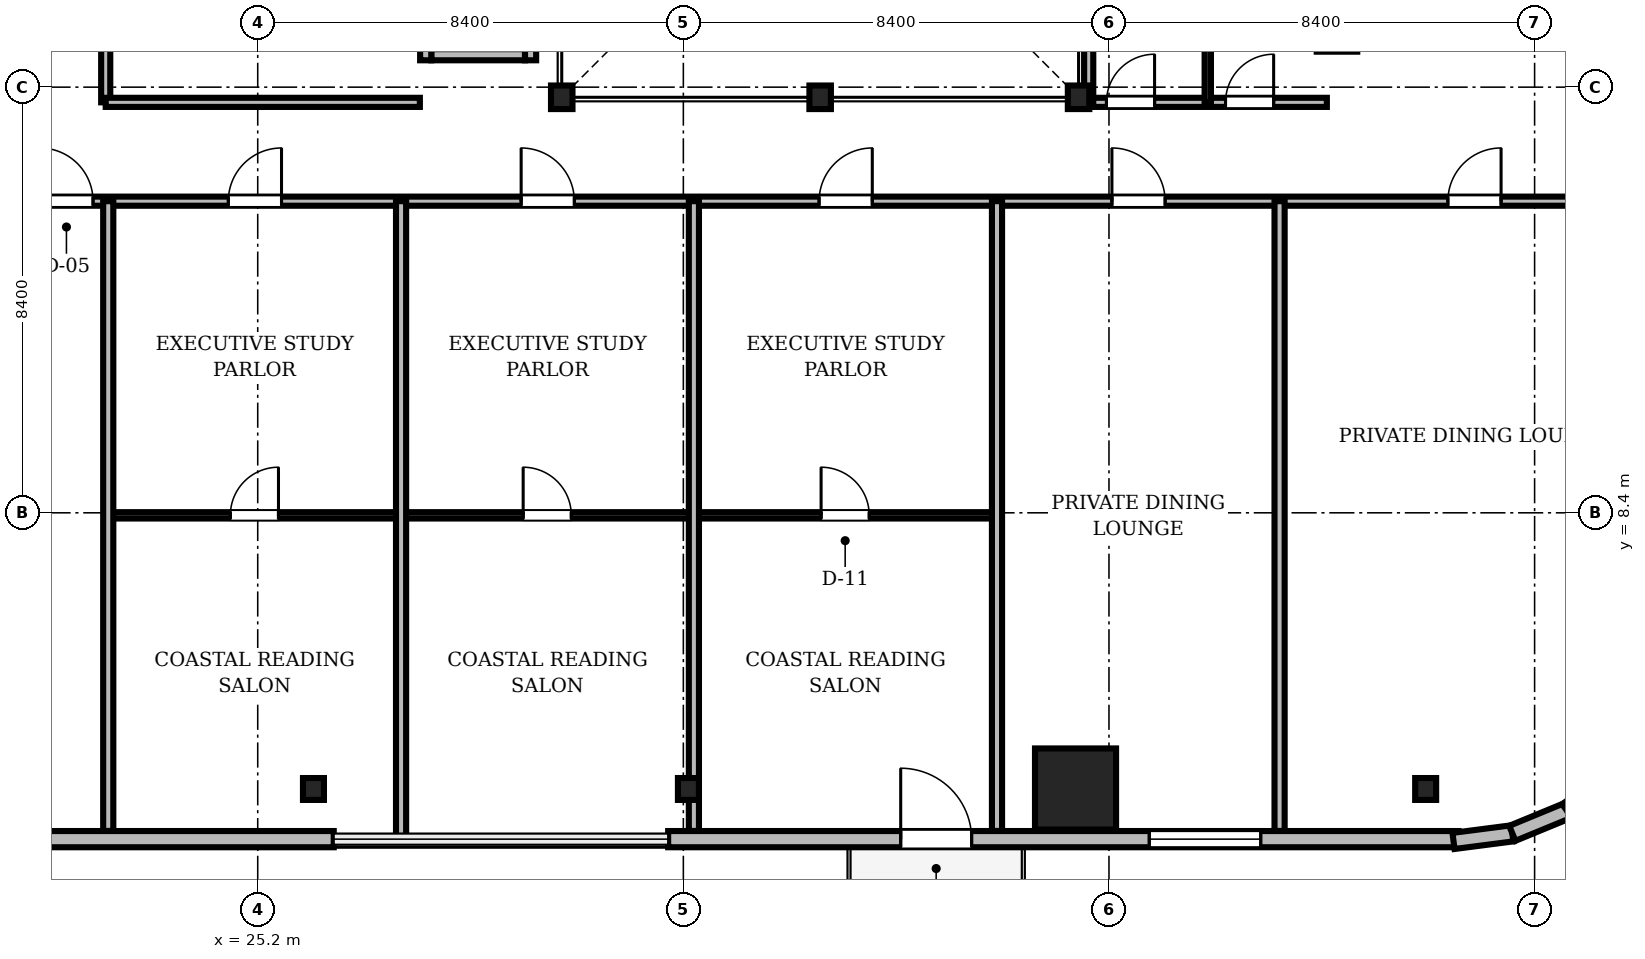
"""IFC4 building model, lengths in metres.
Left out: names, types, materials, properties, quantities, classifications, styles, units other than length and angle.
Written with IfcOpenShell. Run it as: python <this file> out.ifc"""

import sys

from ifc_helpers import new_model, si_unit, direction, frame, frame_2d, origin, origin_2d, place, context, subcontext, project, spatial, rectangle, i_section, extrude, source, transform, mapped, element, fill, save


model = new_model("IFC4")
c1 = context("Model", 3, precision=1e-05, world=origin(), true_north=direction((0.0, 1.0)))
c2 = subcontext(c1, "Body", "Model", "MODEL_VIEW")
j1 = project(units=[si_unit("LENGTHUNIT", "METRE"), si_unit("PLANEANGLEUNIT", "RADIAN")], contexts=[c1])
p1 = place(None, origin())
s1 = spatial("IfcSite", under=j1, at=p1, CompositionType="ELEMENT")
p2 = place(p1, origin())
s2 = spatial("IfcBuilding", under=s1, at=p2, CompositionType="ELEMENT")
p3 = place(p2, frame((0.0, 0.0, 144.6)))
s3 = spatial("IfcBuildingStorey", under=s2, at=p3, CompositionType="ELEMENT", Elevation=144.6)
m1 = source(origin(), c2, "Body", "SweptSolid", [
    extrude(i_section(OverallWidth=0.424, OverallDepth=0.465, WebThickness=0.035, FlangeThickness=0.056, FilletRadius=0.015, at=origin_2d()), origin(), (0.0, 0.0, 1.0), 3.46),
])
for number, where, z_axis, x_axis in (
    (1, (31.2, 16.6, 0.0), (0.0, 0.0, 1.0), (1.0, 0.0, 0.0)),
    (2, (36.3, 16.6, 0.0), (0.0, 0.0, 1.0), (1.0, 0.0, 0.0)),
    (3, (41.4, 16.6, 0.0), (0.0, 0.0, 1.0), (1.0, 0.0, 0.0)),
):
    element("IfcColumn", number, at=place(p3, frame(where, z_axis=z_axis, x_axis=x_axis)), inside=s3, PredefinedType="COLUMN", context=c2, shape_type="MappedRepresentation", body=[
        mapped(m1, transform((0.0, 0.0, 0.0), scale=1.0)),
    ])
m2 = source(origin(), c2, "Body", "SweptSolid", [
    extrude(rectangle(XDim=1.6, YDim=1.6, at=origin_2d()), origin(), (0.0, 0.0, 1.0), 3.46),
])
p4 = place(p3, frame((41.34, 2.95, 0.0), z_axis=(0.0, 0.0, 1.0), x_axis=(1.0, 0.0, 0.0)))
e4 = element("IfcColumn", 4, at=p4, inside=s3, PredefinedType="COLUMN", context=c2, shape_type="MappedRepresentation", body=[
    mapped(m2, transform((0.0, 0.0, 0.0), scale=1.0)),
])
m3 = source(origin(), c2, "Body", "SweptSolid", [
    extrude(i_section(OverallWidth=0.414, OverallDepth=0.432, WebThickness=0.026, FlangeThickness=0.04, FilletRadius=0.015, at=origin_2d()), origin(), (0.0, 0.0, 1.0), 3.46),
])
for number, where, z_axis, x_axis in (
    (5, (26.3, 2.95, 0.0), (0.0, 0.0, 1.0), (1.0, 0.0, 0.0)),
    (6, (33.7, 2.95, 0.0), (0.0, 0.0, 1.0), (1.0, 0.0, 0.0)),
    (7, (48.25, 2.95, 0.0), (0.0, 0.0, 1.0), (1.0, 0.0, 0.0)),
):
    element("IfcColumn", number, at=place(p3, frame(where, z_axis=z_axis, x_axis=x_axis)), inside=s3, PredefinedType="COLUMN", context=c2, shape_type="MappedRepresentation", body=[
        mapped(m3, transform((0.0, 0.0, 0.0), scale=1.0)),
    ])
m4 = source(origin(), c2, "Body", "SweptSolid", [
    extrude(rectangle(XDim=15.6, YDim=0.32, at=frame_2d((7.8, 0.0))), origin(), (0.0, 0.0, 1.0), 3.46),
])
p5 = place(p3, frame((11.1, 1.96, 0.0), z_axis=(0.0, 0.0, 1.0), x_axis=(1.0, 0.0, 0.0)))
e8 = element("IfcWall", 8, at=p5, inside=s3, PredefinedType="SOLIDWALL", context=c2, shape_type="MappedRepresentation", body=[
    mapped(m4, transform((0.0, 0.0, 0.0), scale=1.0)),
])
m5 = source(origin(), c2, "Body", "SweptSolid", [
    extrude(rectangle(XDim=2.2, YDim=2.4, at=frame_2d((1.1, 1.2))), frame((0.0, 0.17, 0.0), z_axis=(0.0, -1.0, 0.0), x_axis=(1.0, 0.0, 0.0)), (0.0, 0.0, 1.0), 0.34),
])
p6 = place(p5, frame((3.005, 0.0, 0.72)))
e9 = element("IfcOpeningElement", 9, at=p6, cuts=e8, PredefinedType="OPENING", context=c2, shape_type="MappedRepresentation", body=[
    mapped(m5, transform((0.0, 0.0, 0.0), scale=1.0)),
])
p7 = place(p3, frame((33.3, 1.96, 0.0), z_axis=(0.0, 0.0, 1.0), x_axis=(1.0, 0.0, 0.0)))
e10 = element("IfcWall", 10, at=p7, inside=s3, PredefinedType="SOLIDWALL", context=c2, shape_type="MappedRepresentation", body=[
    mapped(m4, transform((0.0, 0.0, 0.0), scale=1.0)),
])
m6 = source(origin(), c2, "Body", "SweptSolid", [
    extrude(rectangle(XDim=1.4, YDim=2.3, at=frame_2d((0.7, 1.15))), frame((0.0, 0.17, 0.0), z_axis=(0.0, -1.0, 0.0), x_axis=(1.0, 0.0, 0.0)), (0.0, 0.0, 1.0), 0.34),
])
p8 = place(p7, frame((4.59, 0.0, 0.0)))
e11 = element("IfcOpeningElement", 11, at=p8, cuts=e10, PredefinedType="OPENING", context=c2, shape_type="MappedRepresentation", body=[
    mapped(m6, transform((0.0, 0.0, 0.0), scale=1.0)),
])
p9 = place(p7, frame((9.495, 0.0, 0.72)))
e12 = element("IfcOpeningElement", 12, at=p9, cuts=e10, PredefinedType="OPENING", context=c2, shape_type="MappedRepresentation", body=[
    mapped(m5, transform((0.0, 0.0, 0.0), scale=1.0)),
])
m7 = source(origin(), c2, "Body", "SweptSolid", [
    extrude(rectangle(XDim=1.17, YDim=0.32, at=frame_2d((0.585, 0.0))), origin(), (0.0, 0.0, 1.0), 3.46),
])
p10 = place(p3, frame((48.8, 1.925, 0.0), z_axis=(0.0, 0.0, 1.0), x_axis=(0.991762485493, 0.128090485085, 0.0)))
e13 = element("IfcWall", 13, at=p10, inside=s3, PredefinedType="SOLIDWALL", context=c2, shape_type="MappedRepresentation", body=[
    mapped(m7, transform((0.0, 0.0, 0.0), scale=1.0)),
])
m8 = source(origin(), c2, "Body", "SweptSolid", [
    extrude(rectangle(XDim=1.169, YDim=0.32, at=frame_2d((0.585, 0.0))), origin(), (0.0, 0.0, 1.0), 3.46),
])
p11 = place(p3, frame((49.96, 2.074, 0.0), z_axis=(0.0, 0.0, 1.0), x_axis=(0.924479075121, 0.381232789334, 0.0)))
e14 = element("IfcWall", 14, at=p11, inside=s3, PredefinedType="SOLIDWALL", context=c2, shape_type="MappedRepresentation", body=[
    mapped(m8, transform((0.0, 0.0, 0.0), scale=1.0)),
])
m9 = source(origin(), c2, "Body", "SweptSolid", [
    extrude(rectangle(XDim=1.169, YDim=0.32, at=frame_2d((0.584, 0.0))), origin(), (0.0, 0.0, 1.0), 3.46),
])
p12 = place(p3, frame((51.041, 2.52, 0.0), z_axis=(0.0, 0.0, 1.0), x_axis=(0.793663520347, 0.608356981114, 0.0)))
e15 = element("IfcWall", 15, at=p12, inside=s3, PredefinedType="SOLIDWALL", context=c2, shape_type="MappedRepresentation", body=[
    mapped(m9, transform((0.0, 0.0, 0.0), scale=1.0)),
])
m10 = source(origin(), c2, "Body", "SweptSolid", [
    extrude(rectangle(XDim=1.85, YDim=0.22, at=frame_2d((0.925, 0.0))), origin(), (0.0, 0.0, 1.0), 3.46),
])
p13 = place(p3, frame((28.625, 17.44, 0.0), z_axis=(0.0, 0.0, 1.0), x_axis=(1.0, 0.0, 0.0)))
e16 = element("IfcWall", 16, at=p13, inside=s3, PredefinedType="SOLIDWALL", context=c2, shape_type="MappedRepresentation", body=[
    mapped(m10, transform((0.0, 0.0, 0.0), scale=1.0)),
])
m11 = source(origin(), c2, "Body", "SweptSolid", [
    extrude(rectangle(XDim=2.54, YDim=0.22, at=frame_2d((1.27, 0.0))), origin(), (0.0, 0.0, 1.0), 3.46),
])
for number, where, z_axis, x_axis in (
    (17, (28.515, 17.33, 0.0), (0.0, 0.0, 1.0), (0.0, 1.0, 0.0)),
    (18, (30.585, 17.33, 0.0), (0.0, 0.0, 1.0), (0.0, 1.0, 0.0)),
):
    element("IfcWall", number, at=place(p3, frame(where, z_axis=z_axis, x_axis=x_axis)), inside=s3, PredefinedType="SOLIDWALL", context=c2, shape_type="MappedRepresentation", body=[
        mapped(m11, transform((0.0, 0.0, 0.0), scale=1.0)),
    ])
m12 = source(origin(), c2, "Body", "SweptSolid", [
    extrude(rectangle(XDim=46.156, YDim=0.18, at=frame_2d((23.078, 0.0))), origin(), (0.0, 0.0, 1.0), 2.702),
])
p14 = place(p3, frame((6.922, 14.55, 0.0), z_axis=(0.0, 0.0, 1.0), x_axis=(1.0, 0.0, 0.0)))
e19 = element("IfcWall", 19, at=p14, inside=s3, PredefinedType="PARTITIONING", context=c2, shape_type="MappedRepresentation", body=[
    mapped(m12, transform((0.0, 0.0, 0.0), scale=1.0)),
])
m13 = source(origin(), c2, "Body", "SweptSolid", [
    extrude(rectangle(XDim=1.05, YDim=2.2, at=frame_2d((0.525, 1.1))), frame((0.0, 0.1, 0.0), z_axis=(0.0, -1.0, 0.0), x_axis=(1.0, 0.0, 0.0)), (0.0, 0.0, 1.0), 0.2),
])
p15 = place(p14, frame((13.978, 0.0, 0.0)))
e20 = element("IfcOpeningElement", 20, at=p15, cuts=e19, PredefinedType="OPENING", context=c2, shape_type="MappedRepresentation", body=[
    mapped(m13, transform((0.0, 0.0, 0.0), scale=1.0)),
])
p16 = place(p14, frame((17.698, 0.0, 0.0)))
e21 = element("IfcOpeningElement", 21, at=p16, cuts=e19, PredefinedType="OPENING", context=c2, shape_type="MappedRepresentation", body=[
    mapped(m13, transform((0.0, 0.0, 0.0), scale=1.0)),
])
p17 = place(p14, frame((23.477, 0.0, 0.0)))
e22 = element("IfcOpeningElement", 22, at=p17, cuts=e19, PredefinedType="OPENING", context=c2, shape_type="MappedRepresentation", body=[
    mapped(m13, transform((0.0, 0.0, 0.0), scale=1.0)),
])
p18 = place(p14, frame((29.357, 0.0, 0.0)))
e23 = element("IfcOpeningElement", 23, at=p18, cuts=e19, PredefinedType="OPENING", context=c2, shape_type="MappedRepresentation", body=[
    mapped(m13, transform((0.0, 0.0, 0.0), scale=1.0)),
])
p19 = place(p14, frame((35.136, 0.0, 0.0)))
e24 = element("IfcOpeningElement", 24, at=p19, cuts=e19, PredefinedType="OPENING", context=c2, shape_type="MappedRepresentation", body=[
    mapped(m13, transform((0.0, 0.0, 0.0), scale=1.0)),
])
p20 = place(p14, frame((41.766, 0.0, 0.0)))
e25 = element("IfcOpeningElement", 25, at=p20, cuts=e19, PredefinedType="OPENING", context=c2, shape_type="MappedRepresentation", body=[
    mapped(m13, transform((0.0, 0.0, 0.0), scale=1.0)),
])
m14 = source(origin(), c2, "Body", "SweptSolid", [
    extrude(rectangle(XDim=5.982, YDim=0.125, at=frame_2d((2.991, 0.0))), origin(), (0.0, 0.0, 1.0), 2.852),
])
p21 = place(p3, frame((33.808, 8.35, 0.0), z_axis=(0.0, 0.0, 1.0), x_axis=(1.0, 0.0, 0.0)))
e26 = element("IfcWall", 26, at=p21, inside=s3, PredefinedType="PARTITIONING", context=c2, shape_type="MappedRepresentation", body=[
    mapped(m14, transform((0.0, 0.0, 0.0), scale=1.0)),
])
m15 = source(origin(), c2, "Body", "SweptSolid", [
    extrude(rectangle(XDim=0.95, YDim=2.15, at=frame_2d((0.475, 1.075))), frame((0.0, 0.073, 0.0), z_axis=(0.0, -1.0, 0.0), x_axis=(1.0, 0.0, 0.0)), (0.0, 0.0, 1.0), 0.145),
])
p22 = place(p21, frame((2.51, 0.0, 0.0)))
e27 = element("IfcOpeningElement", 27, at=p22, cuts=e26, PredefinedType="OPENING", context=c2, shape_type="MappedRepresentation", body=[
    mapped(m15, transform((0.0, 0.0, 0.0), scale=1.0)),
])
m16 = source(origin(), c2, "Body", "SweptSolid", [
    extrude(rectangle(XDim=5.779, YDim=0.125, at=frame_2d((2.89, 0.0))), origin(), (0.0, 0.0, 1.0), 2.852),
])
p23 = place(p3, frame((22.25, 8.35, 0.0), z_axis=(0.0, 0.0, 1.0), x_axis=(1.0, 0.0, 0.0)))
e28 = element("IfcWall", 28, at=p23, inside=s3, PredefinedType="PARTITIONING", context=c2, shape_type="MappedRepresentation", body=[
    mapped(m16, transform((0.0, 0.0, 0.0), scale=1.0)),
])
p24 = place(p23, frame((2.41, 0.0, 0.0)))
e29 = element("IfcOpeningElement", 29, at=p24, cuts=e28, PredefinedType="OPENING", context=c2, shape_type="MappedRepresentation", body=[
    mapped(m15, transform((0.0, 0.0, 0.0), scale=1.0)),
])
p25 = place(p3, frame((28.029, 8.35, 0.0), z_axis=(0.0, 0.0, 1.0), x_axis=(1.0, 0.0, 0.0)))
e30 = element("IfcWall", 30, at=p25, inside=s3, PredefinedType="PARTITIONING", context=c2, shape_type="MappedRepresentation", body=[
    mapped(m16, transform((0.0, 0.0, 0.0), scale=1.0)),
])
p26 = place(p25, frame((2.41, 0.0, 0.0)))
e31 = element("IfcOpeningElement", 31, at=p26, cuts=e30, PredefinedType="OPENING", context=c2, shape_type="MappedRepresentation", body=[
    mapped(m15, transform((0.0, 0.0, 0.0), scale=1.0)),
])
m17 = source(origin(), c2, "Body", "SweptSolid", [
    extrude(rectangle(XDim=5.4, YDim=0.18, at=frame_2d((2.7, 0.0))), origin(), (0.0, 0.0, 1.0), 2.852),
])
p27 = place(p3, frame((22.2, 16.5, 0.0), z_axis=(0.0, 0.0, 1.0), x_axis=(0.0, 1.0, 0.0)))
e32 = element("IfcWall", 32, at=p27, inside=s3, PredefinedType="PARTITIONING", context=c2, shape_type="MappedRepresentation", body=[
    mapped(m17, transform((0.0, 0.0, 0.0), scale=1.0)),
])
p28 = place(p27, frame((2.0, 0.0, 0.0)))
e33 = element("IfcOpeningElement", 33, at=p28, cuts=e32, PredefinedType="OPENING", context=c2, shape_type="MappedRepresentation", body=[
    mapped(m13, transform((0.0, 0.0, 0.0), scale=1.0)),
])
m18 = source(origin(), c2, "Body", "SweptSolid", [
    extrude(rectangle(XDim=4.7, YDim=0.18, at=frame_2d((2.35, 0.0))), origin(), (0.0, 0.0, 1.0), 2.852),
])
p29 = place(p3, frame((41.6, 16.5, 0.0), z_axis=(0.0, 0.0, 1.0), x_axis=(1.0, 0.0, 0.0)))
e34 = element("IfcWall", 34, at=p29, inside=s3, PredefinedType="PARTITIONING", context=c2, shape_type="MappedRepresentation", body=[
    mapped(m18, transform((0.0, 0.0, 0.0), scale=1.0)),
])
m19 = source(origin(), c2, "Body", "SweptSolid", [
    extrude(rectangle(XDim=0.95, YDim=2.15, at=frame_2d((0.475, 1.075))), frame((0.0, 0.1, 0.0), z_axis=(0.0, -1.0, 0.0), x_axis=(1.0, 0.0, 0.0)), (0.0, 0.0, 1.0), 0.2),
])
p30 = place(p29, frame((0.35, 0.0, 0.0)))
e35 = element("IfcOpeningElement", 35, at=p30, cuts=e34, PredefinedType="OPENING", context=c2, shape_type="MappedRepresentation", body=[
    mapped(m19, transform((0.0, 0.0, 0.0), scale=1.0)),
])
p31 = place(p29, frame((2.7, 0.0, 0.0)))
e36 = element("IfcOpeningElement", 36, at=p31, cuts=e34, PredefinedType="OPENING", context=c2, shape_type="MappedRepresentation", body=[
    mapped(m19, transform((0.0, 0.0, 0.0), scale=1.0)),
])
m20 = source(origin(), c2, "Body", "SweptSolid", [
    extrude(rectangle(XDim=12.428, YDim=0.2, at=frame_2d((6.214, 0.0))), origin(), (0.0, 0.0, 1.0), 2.702),
])
p32 = place(p3, frame((22.25, 2.122, 0.0), z_axis=(0.0, 0.0, 1.0), x_axis=(0.0, 1.0, 0.0)))
e37 = element("IfcWall", 37, at=p32, inside=s3, PredefinedType="PARTITIONING", context=c2, shape_type="MappedRepresentation", body=[
    mapped(m20, transform((0.0, 0.0, 0.0), scale=1.0)),
])
m21 = source(origin(), c2, "Body", "SweptSolid", [
    extrude(rectangle(XDim=12.62, YDim=0.2, at=frame_2d((6.31, 0.0))), origin(), (0.0, 0.0, 1.0), 2.702),
])
p33 = place(p3, frame((28.029, 1.93, 0.0), z_axis=(0.0, 0.0, 1.0), x_axis=(0.0, 1.0, 0.0)))
e38 = element("IfcWall", 38, at=p33, inside=s3, PredefinedType="PARTITIONING", context=c2, shape_type="MappedRepresentation", body=[
    mapped(m21, transform((0.0, 0.0, 0.0), scale=1.0)),
])
for number, where, z_axis, x_axis in (
    (39, (33.808, 2.122, 0.0), (0.0, 0.0, 1.0), (0.0, 1.0, 0.0)),
    (40, (39.79, 2.122, 0.0), (0.0, 0.0, 1.0), (0.0, 1.0, 0.0)),
    (41, (45.367, 2.122, 0.0), (0.0, 0.0, 1.0), (0.0, 1.0, 0.0)),
):
    element("IfcWall", number, at=place(p3, frame(where, z_axis=z_axis, x_axis=x_axis)), inside=s3, PredefinedType="PARTITIONING", context=c2, shape_type="MappedRepresentation", body=[
        mapped(m20, transform((0.0, 0.0, 0.0), scale=1.0)),
    ])
m22 = source(origin(), c2, "Body", "SweptSolid", [
    extrude(rectangle(XDim=7.15, YDim=0.18, at=frame_2d((3.575, 0.0))), origin(), (0.0, 0.0, 1.0), 2.852),
])
p34 = place(p3, frame((41.6, 16.5, 0.0), z_axis=(0.0, 0.0, 1.0), x_axis=(0.0, 1.0, 0.0)))
e42 = element("IfcWall", 42, at=p34, inside=s3, PredefinedType="PARTITIONING", context=c2, shape_type="MappedRepresentation", body=[
    mapped(m22, transform((0.0, 0.0, 0.0), scale=1.0)),
])
m23 = source(origin(), c2, "Body", "SweptSolid", [
    extrude(rectangle(XDim=7.15, YDim=0.125, at=frame_2d((3.575, 0.0))), origin(), (0.0, 0.0, 1.0), 2.852),
])
p35 = place(p3, frame((43.95, 16.5, 0.0), z_axis=(0.0, 0.0, 1.0), x_axis=(0.0, 1.0, 0.0)))
e43 = element("IfcWall", 43, at=p35, inside=s3, PredefinedType="PARTITIONING", context=c2, shape_type="MappedRepresentation", body=[
    mapped(m23, transform((0.0, 0.0, 0.0), scale=1.0)),
])
m24 = source(origin(), c2, "Body", "SweptSolid", [
    extrude(rectangle(XDim=6.2, YDim=0.18, at=frame_2d((3.1, 0.0))), origin(), (0.0, 0.0, 1.0), 3.46),
])
p36 = place(p3, frame((22.2, 16.5, 0.0), z_axis=(0.0, 0.0, 1.0), x_axis=(1.0, 0.0, 0.0)))
e44 = element("IfcWall", 44, at=p36, inside=s3, PredefinedType="PARTITIONING", context=c2, shape_type="MappedRepresentation", body=[
    mapped(m24, transform((0.0, 0.0, 0.0), scale=1.0)),
])
m25 = source(origin(), c2, "Body", "SweptSolid", [
    extrude(rectangle(XDim=1.4, YDim=2.3, at=frame_2d((0.7, 1.15))), frame((0.0, 0.025, 0.0), z_axis=(0.0, -1.0, 0.0), x_axis=(1.0, 0.0, 0.0)), (0.0, 0.0, 1.0), 0.05),
])
p37 = place(p8, frame((1.4, 0.0, 0.0), z_axis=(0.0, 0.0, 1.0), x_axis=(-1.0, 0.0, 0.0)))
e45 = element("IfcDoor", 45, at=p37, inside=s3, OperationType="DOUBLE_DOOR_SLIDING", PredefinedType="DOOR", context=c2, shape_type="MappedRepresentation", body=[
    mapped(m25, transform((0.0, 0.0, 0.0), scale=1.0)),
])
fill(e11, e45)
m26 = source(origin(), c2, "Body", "SweptSolid", [
    extrude(rectangle(XDim=2.2, YDim=2.4, at=frame_2d((1.1, 1.2))), frame((0.0, 0.03, 0.0), z_axis=(0.0, -1.0, 0.0), x_axis=(1.0, 0.0, 0.0)), (0.0, 0.0, 1.0), 0.06),
])
p38 = place(p9, origin())
e46 = element("IfcWindow", 46, at=p38, inside=s3, PartitioningType="SINGLE_PANEL", PredefinedType="WINDOW", context=c2, shape_type="MappedRepresentation", body=[
    mapped(m26, transform((0.0, 0.0, 0.0), scale=1.0)),
])
fill(e12, e46)
m27 = source(origin(), c2, "Body", "SweptSolid", [
    extrude(rectangle(XDim=1.05, YDim=2.2, at=frame_2d((0.525, 1.1))), frame((0.0, 0.025, 0.0), z_axis=(0.0, -1.0, 0.0), x_axis=(1.0, 0.0, 0.0)), (0.0, 0.0, 1.0), 0.05),
])
p39 = place(p15, origin())
e47 = element("IfcDoor", 47, at=p39, inside=s3, OperationType="SINGLE_SWING_LEFT", PredefinedType="DOOR", context=c2, shape_type="MappedRepresentation", body=[
    mapped(m27, transform((0.0, 0.0, 0.0), scale=1.0)),
])
fill(e20, e47)
p40 = place(p16, origin())
e48 = element("IfcDoor", 48, at=p40, inside=s3, OperationType="SINGLE_SWING_RIGHT", PredefinedType="DOOR", context=c2, shape_type="MappedRepresentation", body=[
    mapped(m27, transform((0.0, 0.0, 0.0), scale=1.0)),
])
fill(e21, e48)
p41 = place(p17, origin())
e49 = element("IfcDoor", 49, at=p41, inside=s3, OperationType="SINGLE_SWING_LEFT", PredefinedType="DOOR", context=c2, shape_type="MappedRepresentation", body=[
    mapped(m27, transform((0.0, 0.0, 0.0), scale=1.0)),
])
fill(e22, e49)
p42 = place(p18, origin())
e50 = element("IfcDoor", 50, at=p42, inside=s3, OperationType="SINGLE_SWING_RIGHT", PredefinedType="DOOR", context=c2, shape_type="MappedRepresentation", body=[
    mapped(m27, transform((0.0, 0.0, 0.0), scale=1.0)),
])
fill(e23, e50)
p43 = place(p19, origin())
e51 = element("IfcDoor", 51, at=p43, inside=s3, OperationType="SINGLE_SWING_LEFT", PredefinedType="DOOR", context=c2, shape_type="MappedRepresentation", body=[
    mapped(m27, transform((0.0, 0.0, 0.0), scale=1.0)),
])
fill(e24, e51)
p44 = place(p20, origin())
e52 = element("IfcDoor", 52, at=p44, inside=s3, OperationType="SINGLE_SWING_RIGHT", PredefinedType="DOOR", context=c2, shape_type="MappedRepresentation", body=[
    mapped(m27, transform((0.0, 0.0, 0.0), scale=1.0)),
])
fill(e25, e52)
m28 = source(origin(), c2, "Body", "SweptSolid", [
    extrude(rectangle(XDim=0.95, YDim=2.15, at=frame_2d((0.475, 1.075))), frame((0.0, 0.025, 0.0), z_axis=(0.0, -1.0, 0.0), x_axis=(1.0, 0.0, 0.0)), (0.0, 0.0, 1.0), 0.05),
])
p45 = place(p22, origin())
e53 = element("IfcDoor", 53, at=p45, inside=s3, OperationType="SINGLE_SWING_LEFT", PredefinedType="DOOR", context=c2, shape_type="MappedRepresentation", body=[
    mapped(m28, transform((0.0, 0.0, 0.0), scale=1.0)),
])
fill(e27, e53)
p46 = place(p24, origin())
e54 = element("IfcDoor", 54, at=p46, inside=s3, OperationType="SINGLE_SWING_RIGHT", PredefinedType="DOOR", context=c2, shape_type="MappedRepresentation", body=[
    mapped(m28, transform((0.0, 0.0, 0.0), scale=1.0)),
])
fill(e29, e54)
p47 = place(p26, origin())
e55 = element("IfcDoor", 55, at=p47, inside=s3, OperationType="SINGLE_SWING_LEFT", PredefinedType="DOOR", context=c2, shape_type="MappedRepresentation", body=[
    mapped(m28, transform((0.0, 0.0, 0.0), scale=1.0)),
])
fill(e31, e55)
p48 = place(p30, origin())
e56 = element("IfcDoor", 56, at=p48, inside=s3, OperationType="SINGLE_SWING_RIGHT", PredefinedType="DOOR", context=c2, shape_type="MappedRepresentation", body=[
    mapped(m28, transform((0.0, 0.0, 0.0), scale=1.0)),
])
fill(e35, e56)
p49 = place(p31, origin())
e57 = element("IfcDoor", 57, at=p49, inside=s3, OperationType="SINGLE_SWING_RIGHT", PredefinedType="DOOR", context=c2, shape_type="MappedRepresentation", body=[
    mapped(m28, transform((0.0, 0.0, 0.0), scale=1.0)),
])
fill(e36, e57)
save(model, sys.argv[1])
